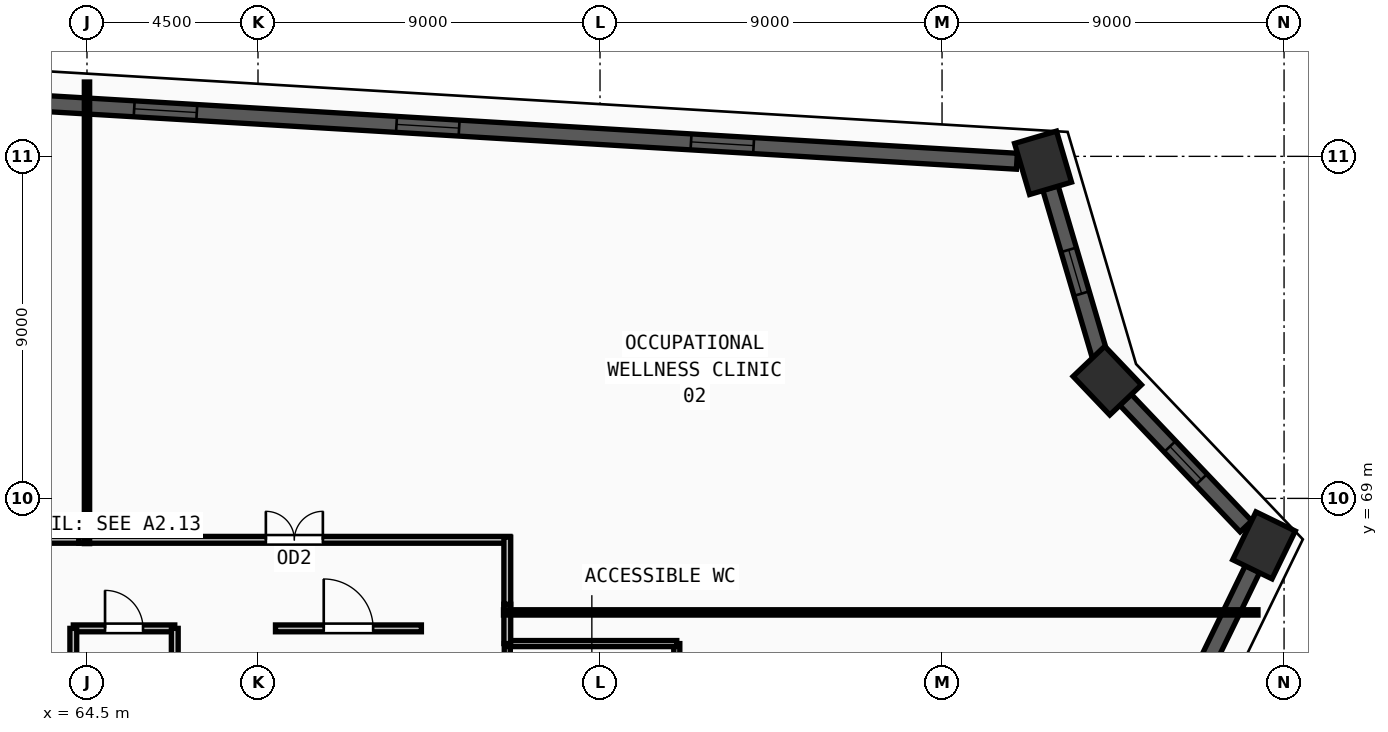
"""IFC4 building model, lengths in metres.
Left out: names, types, materials, properties, quantities, classifications, styles, units other than length and angle.
Written with IfcOpenShell. Run it as: python <this file> out.ifc"""

import sys

from ifc_helpers import new_model, si_unit, direction, frame, frame_2d, origin, origin_2d, place, context, subcontext, project, spatial, rectangle, extrude, source, transform, mapped, element, fill, save


model = new_model("IFC4")
c1 = context("Model", 3, precision=1e-05, world=origin(), true_north=direction((0.0, 1.0)))
c2 = subcontext(c1, "Body", "Model", "MODEL_VIEW")
j1 = project(units=[si_unit("LENGTHUNIT", "METRE"), si_unit("PLANEANGLEUNIT", "RADIAN")], contexts=[c1])
p1 = place(None, origin())
s1 = spatial("IfcSite", under=j1, at=p1, CompositionType="ELEMENT")
p2 = place(p1, origin())
s2 = spatial("IfcBuilding", under=s1, at=p2, CompositionType="ELEMENT")
p3 = place(p2, frame((0.0, 0.0, 144.0)))
s3 = spatial("IfcBuildingStorey", under=s2, at=p3, CompositionType="ELEMENT", Elevation=144.0)
m1 = source(origin(), c2, "Body", "SweptSolid", [
    extrude(rectangle(XDim=1.4, YDim=1.15, at=origin_2d()), origin(), (0.0, 0.0, 1.0), 3.75),
])
for number, where, z_axis, x_axis in (
    (1, (89.658, 77.83, 0.0), (0.0, 0.0, 1.0), (-0.283, 0.959, 0.0)),
    (2, (91.348, 72.099, 0.0), (0.0, 0.0, 1.0), (-0.689, 0.725, 0.0)),
    (3, (95.472, 67.764, 0.0), (0.0, 0.0, 1.0), (0.437, 0.899, 0.0)),
):
    element("IfcColumn", number, at=place(p3, frame(where, z_axis=z_axis, x_axis=x_axis)), inside=s3, PredefinedType="COLUMN", context=c2, shape_type="MappedRepresentation", body=[
        mapped(m1, transform((0.0, 0.0, 0.0), x_axis=(1.0, 0.0, 0.0), y_axis=(0.0, 1.0, 0.0), z_axis=(0.0, 0.0, 1.0), scale=1.0)),
    ])
p4 = place(p3, frame((83.968, 44.102, 0.0), z_axis=(0.0, 0.0, 1.0), x_axis=(0.437237241279, 0.899346204105, 0.0)))
e4 = element("IfcWall", 4, at=p4, inside=s3, PredefinedType="SOLIDWALL", context=c2, shape_type="SweptSolid", body=[
    extrude(rectangle(XDim=25.62, YDim=0.42, at=frame_2d((12.81, 0.0))), origin(), (0.0, 0.0, 1.0), 3.57),
])
m2 = source(origin(), c2, "Body", "SweptSolid", [
    extrude(rectangle(XDim=1.65, YDim=1.95, at=frame_2d((0.825, 0.975))), frame((0.0, 0.22, 0.0), z_axis=(0.0, -1.0, 0.0), x_axis=(1.0, 0.0, 0.0)), (0.0, 0.0, 1.0), 0.44),
])
p5 = place(p4, frame((5.58, 0.0, 0.55)))
e5 = element("IfcOpeningElement", 5, at=p5, cuts=e4, PredefinedType="OPENING", context=c2, shape_type="MappedRepresentation", body=[
    mapped(m2, transform((0.0, 0.0, 0.0), x_axis=(1.0, 0.0, 0.0), y_axis=(0.0, 1.0, 0.0), z_axis=(0.0, 0.0, 1.0), scale=1.0)),
])
p6 = place(p4, frame((18.39, 0.0, 0.55)))
e6 = element("IfcOpeningElement", 6, at=p6, cuts=e4, PredefinedType="OPENING", context=c2, shape_type="MappedRepresentation", body=[
    mapped(m2, transform((0.0, 0.0, 0.0), x_axis=(1.0, 0.0, 0.0), y_axis=(0.0, 1.0, 0.0), z_axis=(0.0, 0.0, 1.0), scale=1.0)),
])
p7 = place(p3, frame((94.996, 68.264, 0.0), z_axis=(0.0, 0.0, 1.0), x_axis=(-0.689168939428, 0.724600698956, 0.0)))
e7 = element("IfcWall", 7, at=p7, inside=s3, PredefinedType="SOLIDWALL", context=c2, shape_type="SweptSolid", body=[
    extrude(rectangle(XDim=4.603, YDim=0.42, at=frame_2d((2.301, 0.0))), origin(), (0.0, 0.0, 1.0), 3.57),
])
m3 = source(origin(), c2, "Body", "SweptSolid", [
    extrude(rectangle(XDim=1.2, YDim=1.9, at=frame_2d((0.6, 0.95))), frame((0.0, 0.22, 0.0), z_axis=(0.0, -1.0, 0.0), x_axis=(1.0, 0.0, 0.0)), (0.0, 0.0, 1.0), 0.44),
])
p8 = place(p7, frame((1.701, 0.0, 0.55)))
e8 = element("IfcOpeningElement", 8, at=p8, cuts=e7, PredefinedType="OPENING", context=c2, shape_type="MappedRepresentation", body=[
    mapped(m3, transform((0.0, 0.0, 0.0), x_axis=(1.0, 0.0, 0.0), y_axis=(0.0, 1.0, 0.0), z_axis=(0.0, 0.0, 1.0), scale=1.0)),
])
p9 = place(p3, frame((91.153, 72.761, 0.0), z_axis=(0.0, 0.0, 1.0), x_axis=(-0.2829429476, 0.959136741244, 0.0)))
e9 = element("IfcWall", 9, at=p9, inside=s3, PredefinedType="SOLIDWALL", context=c2, shape_type="SweptSolid", body=[
    extrude(rectangle(XDim=4.595, YDim=0.42, at=frame_2d((2.297, 0.0))), origin(), (0.0, 0.0, 1.0), 3.57),
])
p10 = place(p9, frame((1.697, 0.0, 0.55)))
e10 = element("IfcOpeningElement", 10, at=p10, cuts=e9, PredefinedType="OPENING", context=c2, shape_type="MappedRepresentation", body=[
    mapped(m3, transform((0.0, 0.0, 0.0), x_axis=(1.0, 0.0, 0.0), y_axis=(0.0, 1.0, 0.0), z_axis=(0.0, 0.0, 1.0), scale=1.0)),
])
p11 = place(p3, frame((88.969, 77.871, 0.0), z_axis=(0.0, 0.0, 1.0), x_axis=(-0.998239939478, 0.059304495869, 0.0)))
e11 = element("IfcWall", 11, at=p11, inside=s3, PredefinedType="SOLIDWALL", context=c2, shape_type="SweptSolid", body=[
    extrude(rectangle(XDim=31.057, YDim=0.42, at=frame_2d((15.528, 0.0))), origin(), (0.0, 0.0, 1.0), 3.57),
])
p12 = place(p11, frame((6.939, 0.0, 0.55)))
e12 = element("IfcOpeningElement", 12, at=p12, cuts=e11, PredefinedType="OPENING", context=c2, shape_type="MappedRepresentation", body=[
    mapped(m2, transform((0.0, 0.0, 0.0), x_axis=(1.0, 0.0, 0.0), y_axis=(0.0, 1.0, 0.0), z_axis=(0.0, 0.0, 1.0), scale=1.0)),
])
p13 = place(p11, frame((14.703, 0.0, 0.55)))
e13 = element("IfcOpeningElement", 13, at=p13, cuts=e11, PredefinedType="OPENING", context=c2, shape_type="MappedRepresentation", body=[
    mapped(m2, transform((0.0, 0.0, 0.0), x_axis=(1.0, 0.0, 0.0), y_axis=(0.0, 1.0, 0.0), z_axis=(0.0, 0.0, 1.0), scale=1.0)),
])
p14 = place(p11, frame((21.618, 0.0, 0.55)))
e14 = element("IfcOpeningElement", 14, at=p14, cuts=e11, PredefinedType="OPENING", context=c2, shape_type="MappedRepresentation", body=[
    mapped(m2, transform((0.0, 0.0, 0.0), x_axis=(1.0, 0.0, 0.0), y_axis=(0.0, 1.0, 0.0), z_axis=(0.0, 0.0, 1.0), scale=1.0)),
])
p15 = place(p3, frame((75.56, 62.44, 0.0), z_axis=(0.0, 0.0, 1.0), x_axis=(0.0, 1.0, 0.0)))
e15 = element("IfcWall", 15, at=p15, inside=s3, PredefinedType="PARTITIONING", context=c2, shape_type="SweptSolid", body=[
    extrude(rectangle(XDim=2.74, YDim=0.16, at=frame_2d((1.37, 0.0))), origin(), (0.0, 0.0, 1.0), 3.57),
])
m4 = source(origin(), c2, "Body", "SweptSolid", [
    extrude(rectangle(XDim=1.05, YDim=2.15, at=frame_2d((0.525, 1.075))), frame((0.0, 0.09, 0.0), z_axis=(0.0, -1.0, 0.0), x_axis=(1.0, 0.0, 0.0)), (0.0, 0.0, 1.0), 0.18),
])
p16 = place(p15, frame((0.845, 0.0, 0.0)))
e16 = element("IfcOpeningElement", 16, at=p16, cuts=e15, PredefinedType="OPENING", context=c2, shape_type="MappedRepresentation", body=[
    mapped(m4, transform((0.0, 0.0, 0.0), x_axis=(1.0, 0.0, 0.0), y_axis=(0.0, 1.0, 0.0), z_axis=(0.0, 0.0, 1.0), scale=1.0)),
])
p17 = place(p3, frame((64.14, 65.58, 0.0), z_axis=(0.0, 0.0, 1.0), x_axis=(1.0, 0.0, 0.0)))
e17 = element("IfcWall", 17, at=p17, inside=s3, PredefinedType="PARTITIONING", context=c2, shape_type="SweptSolid", body=[
    extrude(rectangle(XDim=2.67, YDim=0.18, at=frame_2d((1.335, 0.0))), origin(), (0.0, 0.0, 1.0), 3.57),
])
m5 = source(origin(), c2, "Body", "SweptSolid", [
    extrude(rectangle(XDim=1.0, YDim=2.2, at=frame_2d((0.5, 1.1))), frame((0.0, 0.1, 0.0), z_axis=(0.0, -1.0, 0.0), x_axis=(1.0, 0.0, 0.0)), (0.0, 0.0, 1.0), 0.2),
])
p18 = place(p17, frame((0.835, 0.0, 0.0)))
e18 = element("IfcOpeningElement", 18, at=p18, cuts=e17, PredefinedType="OPENING", context=c2, shape_type="MappedRepresentation", body=[
    mapped(m5, transform((0.0, 0.0, 0.0), x_axis=(1.0, 0.0, 0.0), y_axis=(0.0, 1.0, 0.0), z_axis=(0.0, 0.0, 1.0), scale=1.0)),
])
p19 = place(p3, frame((69.46, 65.58, 0.0), z_axis=(0.0, 0.0, 1.0), x_axis=(1.0, 0.0, 0.0)))
e19 = element("IfcWall", 19, at=p19, inside=s3, PredefinedType="PARTITIONING", context=c2, shape_type="SweptSolid", body=[
    extrude(rectangle(XDim=3.84, YDim=0.18, at=frame_2d((1.92, 0.0))), origin(), (0.0, 0.0, 1.0), 3.57),
])
m6 = source(origin(), c2, "Body", "SweptSolid", [
    extrude(rectangle(XDim=1.3, YDim=2.2, at=frame_2d((0.65, 1.1))), frame((0.0, 0.1, 0.0), z_axis=(0.0, -1.0, 0.0), x_axis=(1.0, 0.0, 0.0)), (0.0, 0.0, 1.0), 0.2),
])
p20 = place(p19, frame((1.27, 0.0, 0.0)))
e20 = element("IfcOpeningElement", 20, at=p20, cuts=e19, PredefinedType="OPENING", context=c2, shape_type="MappedRepresentation", body=[
    mapped(m6, transform((0.0, 0.0, 0.0), x_axis=(1.0, 0.0, 0.0), y_axis=(0.0, 1.0, 0.0), z_axis=(0.0, 0.0, 1.0), scale=1.0)),
])
p21 = place(p3, frame((64.285, 67.91, 0.0), z_axis=(0.0, 0.0, 1.0), x_axis=(1.0, 0.0, 0.0)))
e21 = element("IfcWall", 21, at=p21, inside=s3, PredefinedType="PARTITIONING", context=c2, shape_type="SweptSolid", body=[
    extrude(rectangle(XDim=11.345, YDim=0.18, at=frame_2d((5.672, 0.0))), origin(), (0.0, 0.0, 1.0), 3.57),
])
m7 = source(origin(), c2, "Body", "SweptSolid", [
    extrude(rectangle(XDim=1.5, YDim=2.2, at=frame_2d((0.75, 1.1))), frame((0.0, 0.1, 0.0), z_axis=(0.0, -1.0, 0.0), x_axis=(1.0, 0.0, 0.0)), (0.0, 0.0, 1.0), 0.2),
])
p22 = place(p21, frame((4.922, 0.0, 0.0)))
e22 = element("IfcOpeningElement", 22, at=p22, cuts=e21, PredefinedType="OPENING", context=c2, shape_type="MappedRepresentation", body=[
    mapped(m7, transform((0.0, 0.0, 0.0), x_axis=(1.0, 0.0, 0.0), y_axis=(0.0, 1.0, 0.0), z_axis=(0.0, 0.0, 1.0), scale=1.0)),
])
p23 = place(p3, frame((53.785, 67.91, 0.0), z_axis=(0.0, 0.0, 1.0), x_axis=(1.0, 0.0, 0.0)))
e23 = element("IfcWall", 23, at=p23, inside=s3, PredefinedType="PARTITIONING", context=c2, shape_type="SweptSolid", body=[
    extrude(rectangle(XDim=10.5, YDim=0.18, at=frame_2d((5.25, 0.0))), origin(), (0.0, 0.0, 1.0), 3.57),
])
p24 = place(p23, frame((4.5, 0.0, 0.0)))
e24 = element("IfcOpeningElement", 24, at=p24, cuts=e23, PredefinedType="OPENING", context=c2, shape_type="MappedRepresentation", body=[
    mapped(m7, transform((0.0, 0.0, 0.0), x_axis=(1.0, 0.0, 0.0), y_axis=(0.0, 1.0, 0.0), z_axis=(0.0, 0.0, 1.0), scale=1.0)),
])
p25 = place(p3, frame((80.02, 56.54, 0.0), z_axis=(0.0, 0.0, 1.0), x_axis=(0.0, 1.0, 0.0)))
e25 = element("IfcWall", 25, at=p25, inside=s3, PredefinedType="PARTITIONING", context=c2, shape_type="SweptSolid", body=[
    extrude(rectangle(XDim=8.64, YDim=0.16, at=frame_2d((4.32, 0.0))), origin(), (0.0, 0.0, 1.0), 3.155),
])
p26 = place(p3, frame((75.56, 65.18, 0.0), z_axis=(0.0, 0.0, 1.0), x_axis=(1.0, 0.0, 0.0)))
e26 = element("IfcWall", 26, at=p26, inside=s3, PredefinedType="PARTITIONING", context=c2, shape_type="SweptSolid", body=[
    extrude(rectangle(XDim=4.46, YDim=0.16, at=frame_2d((2.23, 0.0))), origin(), (0.0, 0.0, 1.0), 3.57),
])
for number, where, z_axis, x_axis in (
    (27, (64.14, 61.875, 0.0), (0.0, 0.0, 1.0), (0.0, 1.0, 0.0)),
    (28, (66.81, 61.875, 0.0), (0.0, 0.0, 1.0), (0.0, 1.0, 0.0)),
):
    element("IfcWall", number, at=place(p3, frame(where, z_axis=z_axis, x_axis=x_axis)), inside=s3, PredefinedType="PARTITIONING", context=c2, shape_type="SweptSolid", body=[
        extrude(rectangle(XDim=3.705, YDim=0.18, at=frame_2d((1.853, 0.0))), origin(), (0.0, 0.0, 1.0), 3.57),
    ])
p27 = place(p3, frame((75.56, 66.215, 0.0), z_axis=(0.0, 0.0, 1.0), x_axis=(0.0, -1.0, 0.0)))
e29 = element("IfcWall", 29, at=p27, inside=s3, PredefinedType="PARTITIONING", context=c2, shape_type="SweptSolid", body=[
    extrude(rectangle(XDim=1.035, YDim=0.18, at=frame_2d((0.518, 0.0))), origin(), (0.0, 0.0, 1.0), 3.57),
])
p28 = place(p3, frame((75.56, 67.98, 0.0), z_axis=(0.0, 0.0, 1.0), x_axis=(0.0, -1.0, 0.0)))
e30 = element("IfcWall", 30, at=p28, inside=s3, PredefinedType="PARTITIONING", context=c2, shape_type="SweptSolid", body=[
    extrude(rectangle(XDim=1.765, YDim=0.18, at=frame_2d((0.882, 0.0))), origin(), (0.0, 0.0, 1.0), 3.57),
])
p29 = place(p3, frame((75.46, 66.0, 0.0), z_axis=(0.0, 0.0, 1.0), x_axis=(1.0, 0.0, 0.0)))
e31 = element("IfcWall", 31, at=p29, inside=s3, PredefinedType="PARTITIONING", context=c2, shape_type="SweptSolid", body=[
    extrude(rectangle(XDim=19.854, YDim=0.14, at=frame_2d((9.927, 0.0))), origin(), (0.0, 0.0, 1.0), 2.755),
])
p30 = place(p3, frame((64.5, 67.81, 0.0), z_axis=(0.0, 0.0, 1.0), x_axis=(0.0, 1.0, 0.0)))
e32 = element("IfcWall", 32, at=p30, inside=s3, PredefinedType="PARTITIONING", context=c2, shape_type="SweptSolid", body=[
    extrude(rectangle(XDim=12.146, YDim=0.14, at=frame_2d((6.073, 0.0))), origin(), (0.0, 0.0, 1.0), 3.57),
])
m8 = source(origin(), c2, "Body", "SweptSolid", [
    extrude(rectangle(XDim=1.2, YDim=1.9, at=frame_2d((0.6, 0.95))), frame((0.0, 0.03, 0.0), z_axis=(0.0, -1.0, 0.0), x_axis=(1.0, 0.0, 0.0)), (0.0, 0.0, 1.0), 0.06),
])
p31 = place(p8, origin())
e33 = element("IfcWindow", 33, at=p31, inside=s3, PartitioningType="SINGLE_PANEL", PredefinedType="WINDOW", context=c2, shape_type="MappedRepresentation", body=[
    mapped(m8, transform((0.0, 0.0, 0.0), x_axis=(1.0, 0.0, 0.0), y_axis=(0.0, 1.0, 0.0), z_axis=(0.0, 0.0, 1.0), scale=1.0)),
])
fill(e8, e33)
p32 = place(p10, origin())
e34 = element("IfcWindow", 34, at=p32, inside=s3, PartitioningType="SINGLE_PANEL", PredefinedType="WINDOW", context=c2, shape_type="MappedRepresentation", body=[
    mapped(m8, transform((0.0, 0.0, 0.0), x_axis=(1.0, 0.0, 0.0), y_axis=(0.0, 1.0, 0.0), z_axis=(0.0, 0.0, 1.0), scale=1.0)),
])
fill(e10, e34)
m9 = source(origin(), c2, "Body", "SweptSolid", [
    extrude(rectangle(XDim=1.65, YDim=1.95, at=frame_2d((0.825, 0.975))), frame((0.0, 0.03, 0.0), z_axis=(0.0, -1.0, 0.0), x_axis=(1.0, 0.0, 0.0)), (0.0, 0.0, 1.0), 0.06),
])
p33 = place(p12, origin())
e35 = element("IfcWindow", 35, at=p33, inside=s3, PartitioningType="DOUBLE_PANEL_VERTICAL", PredefinedType="WINDOW", context=c2, shape_type="MappedRepresentation", body=[
    mapped(m9, transform((0.0, 0.0, 0.0), x_axis=(1.0, 0.0, 0.0), y_axis=(0.0, 1.0, 0.0), z_axis=(0.0, 0.0, 1.0), scale=1.0)),
])
fill(e12, e35)
p34 = place(p13, origin())
e36 = element("IfcWindow", 36, at=p34, inside=s3, PartitioningType="DOUBLE_PANEL_VERTICAL", PredefinedType="WINDOW", context=c2, shape_type="MappedRepresentation", body=[
    mapped(m9, transform((0.0, 0.0, 0.0), x_axis=(1.0, 0.0, 0.0), y_axis=(0.0, 1.0, 0.0), z_axis=(0.0, 0.0, 1.0), scale=1.0)),
])
fill(e13, e36)
p35 = place(p14, origin())
e37 = element("IfcWindow", 37, at=p35, inside=s3, PartitioningType="DOUBLE_PANEL_VERTICAL", PredefinedType="WINDOW", context=c2, shape_type="MappedRepresentation", body=[
    mapped(m9, transform((0.0, 0.0, 0.0), x_axis=(1.0, 0.0, 0.0), y_axis=(0.0, 1.0, 0.0), z_axis=(0.0, 0.0, 1.0), scale=1.0)),
])
fill(e14, e37)
m10 = source(origin(), c2, "Body", "SweptSolid", [
    extrude(rectangle(XDim=1.0, YDim=2.2, at=frame_2d((0.5, 1.1))), frame((0.0, 0.025, 0.0), z_axis=(0.0, -1.0, 0.0), x_axis=(1.0, 0.0, 0.0)), (0.0, 0.0, 1.0), 0.05),
])
p36 = place(p18, origin())
e38 = element("IfcDoor", 38, at=p36, inside=s3, OperationType="SINGLE_SWING_LEFT", PredefinedType="DOOR", context=c2, shape_type="MappedRepresentation", body=[
    mapped(m10, transform((0.0, 0.0, 0.0), x_axis=(1.0, 0.0, 0.0), y_axis=(0.0, 1.0, 0.0), z_axis=(0.0, 0.0, 1.0), scale=1.0)),
])
fill(e18, e38)
m11 = source(origin(), c2, "Body", "SweptSolid", [
    extrude(rectangle(XDim=1.3, YDim=2.2, at=frame_2d((0.65, 1.1))), frame((0.0, 0.025, 0.0), z_axis=(0.0, -1.0, 0.0), x_axis=(1.0, 0.0, 0.0)), (0.0, 0.0, 1.0), 0.05),
])
p37 = place(p20, origin())
e39 = element("IfcDoor", 39, at=p37, inside=s3, OperationType="SINGLE_SWING_LEFT", PredefinedType="DOOR", context=c2, shape_type="MappedRepresentation", body=[
    mapped(m11, transform((0.0, 0.0, 0.0), x_axis=(1.0, 0.0, 0.0), y_axis=(0.0, 1.0, 0.0), z_axis=(0.0, 0.0, 1.0), scale=1.0)),
])
fill(e20, e39)
m12 = source(origin(), c2, "Body", "SweptSolid", [
    extrude(rectangle(XDim=1.5, YDim=2.2, at=frame_2d((0.75, 1.1))), frame((0.0, 0.025, 0.0), z_axis=(0.0, -1.0, 0.0), x_axis=(1.0, 0.0, 0.0)), (0.0, 0.0, 1.0), 0.05),
])
p38 = place(p22, origin())
e40 = element("IfcDoor", 40, at=p38, inside=s3, OperationType="DOUBLE_DOOR_SINGLE_SWING", PredefinedType="DOOR", context=c2, shape_type="MappedRepresentation", body=[
    mapped(m12, transform((0.0, 0.0, 0.0), x_axis=(1.0, 0.0, 0.0), y_axis=(0.0, 1.0, 0.0), z_axis=(0.0, 0.0, 1.0), scale=1.0)),
])
fill(e22, e40)
save(model, sys.argv[1])
